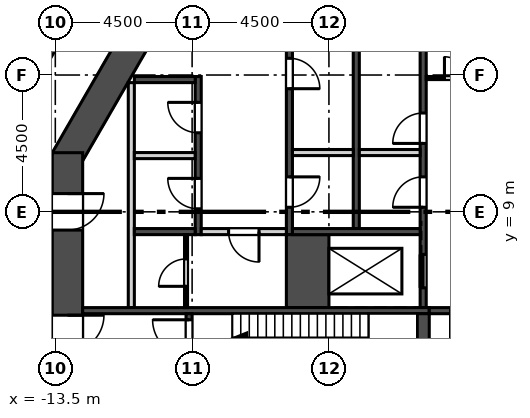
"""IFC4 building model, lengths in metres.
Left out: names, types, materials, properties, quantities, classifications, styles, units other than length and angle.
Written with IfcOpenShell. Run it as: python <this file> out.ifc"""

import sys

from ifc_helpers import new_model, si_unit, direction, frame, frame_2d, origin, place, context, subcontext, project, spatial, rectangle, extrude, element, fill, save


model = new_model("IFC4")
c1 = context("Model", 3, precision=1e-05, world=origin(), true_north=direction((0.0, 1.0)))
c2 = subcontext(c1, "Body", "Model", "MODEL_VIEW")
j1 = project(units=[si_unit("LENGTHUNIT", "METRE"), si_unit("PLANEANGLEUNIT", "RADIAN")], contexts=[c1])
p1 = place(None, origin())
s1 = spatial("IfcSite", under=j1, at=p1, CompositionType="ELEMENT")
p2 = place(p1, origin())
s2 = spatial("IfcBuilding", under=s1, at=p2, CompositionType="ELEMENT")
p3 = place(p2, frame((0.0, 0.0, 218.1)))
s3 = spatial("IfcBuildingStorey", under=s2, at=p3, CompositionType="ELEMENT", Elevation=218.1)
p4 = place(p3, frame((-8.748, 18.35, 0.0), z_axis=(0.0, 0.0, 1.0), x_axis=(-0.499995021168, -0.866028278295, 0.0)))
e1 = element("IfcWall", 1, at=p4, inside=s3, PredefinedType="SHEAR", context=c2, shape_type="SweptSolid", body=[
    extrude(rectangle(XDim=8.839, YDim=1.0, at=frame_2d((4.419, 0.0))), origin(), (0.0, 0.0, 1.0), 5.4),
])
p5 = place(p3, frame((-13.1, 10.945, 0.0), z_axis=(0.0, 0.0, 1.0), x_axis=(0.0, -1.0, 0.0)))
e2 = element("IfcWall", 2, at=p5, inside=s3, PredefinedType="SHEAR", context=c2, shape_type="SweptSolid", body=[
    extrude(rectangle(XDim=9.695, YDim=1.0, at=frame_2d((4.848, 0.0))), origin(), (0.0, 0.0, 1.0), 5.4),
])
p6 = place(p5, frame((5.345, 0.0, 0.0)))
e3 = element("IfcOpeningElement", 3, at=p6, cuts=e2, PredefinedType="OPENING", context=c2, shape_type="SweptSolid", body=[
    extrude(rectangle(XDim=1.2, YDim=2.1, at=frame_2d((0.6, 1.05))), frame((0.0, 0.51, 0.0), z_axis=(0.0, -1.0, 0.0), x_axis=(1.0, 0.0, 0.0)), (0.0, 0.0, 1.0), 1.02),
])
p7 = place(p5, frame((1.345, 0.0, 0.0)))
e4 = element("IfcOpeningElement", 4, at=p7, cuts=e2, PredefinedType="OPENING", context=c2, shape_type="SweptSolid", body=[
    extrude(rectangle(XDim=1.2, YDim=2.1, at=frame_2d((0.6, 1.05))), frame((0.0, 0.51, 0.0), z_axis=(0.0, -1.0, 0.0), x_axis=(1.0, 0.0, 0.0)), (0.0, 0.0, 1.0), 1.02),
])
p8 = place(p3, frame((-4.353, 47.177, 0.0), z_axis=(0.0, 0.0, 1.0), x_axis=(-0.500000533701, -0.866025095652, 0.0)))
e5 = element("IfcWall", 5, at=p8, inside=s3, PredefinedType="SOLIDWALL", context=c2, shape_type="SweptSolid", body=[
    extrude(rectangle(XDim=45.573, YDim=0.34, at=frame_2d((22.787, 0.0))), origin(), (0.0, 0.0, 1.0), 5.0),
])
p9 = place(p8, frame((2.68, 0.0, 0.9)))
e6 = element("IfcOpeningElement", 6, at=p9, cuts=e5, PredefinedType="OPENING", context=c2, shape_type="SweptSolid", body=[
    extrude(rectangle(XDim=1.885, YDim=3.0, at=frame_2d((0.942, 1.5))), frame((0.0, 0.18, 0.0), z_axis=(0.0, -1.0, 0.0), x_axis=(1.0, 0.0, 0.0)), (0.0, 0.0, 1.0), 0.36),
])
p10 = place(p8, frame((5.68, 0.0, 0.9)))
e7 = element("IfcOpeningElement", 7, at=p10, cuts=e5, PredefinedType="OPENING", context=c2, shape_type="SweptSolid", body=[
    extrude(rectangle(XDim=1.885, YDim=3.0, at=frame_2d((0.942, 1.5))), frame((0.0, 0.18, 0.0), z_axis=(0.0, -1.0, 0.0), x_axis=(1.0, 0.0, 0.0)), (0.0, 0.0, 1.0), 0.36),
])
p11 = place(p8, frame((8.68, 0.0, 0.9)))
e8 = element("IfcOpeningElement", 8, at=p11, cuts=e5, PredefinedType="OPENING", context=c2, shape_type="SweptSolid", body=[
    extrude(rectangle(XDim=1.885, YDim=3.0, at=frame_2d((0.942, 1.5))), frame((0.0, 0.18, 0.0), z_axis=(0.0, -1.0, 0.0), x_axis=(1.0, 0.0, 0.0)), (0.0, 0.0, 1.0), 0.36),
])
p12 = place(p8, frame((11.68, 0.0, 0.9)))
e9 = element("IfcOpeningElement", 9, at=p12, cuts=e5, PredefinedType="OPENING", context=c2, shape_type="SweptSolid", body=[
    extrude(rectangle(XDim=1.885, YDim=3.0, at=frame_2d((0.942, 1.5))), frame((0.0, 0.18, 0.0), z_axis=(0.0, -1.0, 0.0), x_axis=(1.0, 0.0, 0.0)), (0.0, 0.0, 1.0), 0.36),
])
p13 = place(p8, frame((14.68, 0.0, 0.9)))
e10 = element("IfcOpeningElement", 10, at=p13, cuts=e5, PredefinedType="OPENING", context=c2, shape_type="SweptSolid", body=[
    extrude(rectangle(XDim=1.885, YDim=3.0, at=frame_2d((0.942, 1.5))), frame((0.0, 0.18, 0.0), z_axis=(0.0, -1.0, 0.0), x_axis=(1.0, 0.0, 0.0)), (0.0, 0.0, 1.0), 0.36),
])
p14 = place(p8, frame((17.68, 0.0, 0.9)))
e11 = element("IfcOpeningElement", 11, at=p14, cuts=e5, PredefinedType="OPENING", context=c2, shape_type="SweptSolid", body=[
    extrude(rectangle(XDim=1.885, YDim=3.0, at=frame_2d((0.942, 1.5))), frame((0.0, 0.18, 0.0), z_axis=(0.0, -1.0, 0.0), x_axis=(1.0, 0.0, 0.0)), (0.0, 0.0, 1.0), 0.36),
])
p15 = place(p8, frame((20.68, 0.0, 0.9)))
e12 = element("IfcOpeningElement", 12, at=p15, cuts=e5, PredefinedType="OPENING", context=c2, shape_type="SweptSolid", body=[
    extrude(rectangle(XDim=1.885, YDim=3.0, at=frame_2d((0.942, 1.5))), frame((0.0, 0.18, 0.0), z_axis=(0.0, -1.0, 0.0), x_axis=(1.0, 0.0, 0.0)), (0.0, 0.0, 1.0), 0.36),
])
p16 = place(p8, frame((23.68, 0.0, 0.9)))
e13 = element("IfcOpeningElement", 13, at=p16, cuts=e5, PredefinedType="OPENING", context=c2, shape_type="SweptSolid", body=[
    extrude(rectangle(XDim=1.885, YDim=3.0, at=frame_2d((0.942, 1.5))), frame((0.0, 0.18, 0.0), z_axis=(0.0, -1.0, 0.0), x_axis=(1.0, 0.0, 0.0)), (0.0, 0.0, 1.0), 0.36),
])
p17 = place(p8, frame((26.68, 0.0, 0.9)))
e14 = element("IfcOpeningElement", 14, at=p17, cuts=e5, PredefinedType="OPENING", context=c2, shape_type="SweptSolid", body=[
    extrude(rectangle(XDim=1.885, YDim=3.0, at=frame_2d((0.942, 1.5))), frame((0.0, 0.18, 0.0), z_axis=(0.0, -1.0, 0.0), x_axis=(1.0, 0.0, 0.0)), (0.0, 0.0, 1.0), 0.36),
])
p18 = place(p8, frame((29.68, 0.0, 0.9)))
e15 = element("IfcOpeningElement", 15, at=p18, cuts=e5, PredefinedType="OPENING", context=c2, shape_type="SweptSolid", body=[
    extrude(rectangle(XDim=1.885, YDim=3.0, at=frame_2d((0.942, 1.5))), frame((0.0, 0.18, 0.0), z_axis=(0.0, -1.0, 0.0), x_axis=(1.0, 0.0, 0.0)), (0.0, 0.0, 1.0), 0.36),
])
p19 = place(p8, frame((32.68, 0.0, 0.9)))
e16 = element("IfcOpeningElement", 16, at=p19, cuts=e5, PredefinedType="OPENING", context=c2, shape_type="SweptSolid", body=[
    extrude(rectangle(XDim=1.885, YDim=3.0, at=frame_2d((0.942, 1.5))), frame((0.0, 0.18, 0.0), z_axis=(0.0, -1.0, 0.0), x_axis=(1.0, 0.0, 0.0)), (0.0, 0.0, 1.0), 0.36),
])
p20 = place(p8, frame((35.68, 0.0, 0.9)))
e17 = element("IfcOpeningElement", 17, at=p20, cuts=e5, PredefinedType="OPENING", context=c2, shape_type="SweptSolid", body=[
    extrude(rectangle(XDim=1.885, YDim=3.0, at=frame_2d((0.942, 1.5))), frame((0.0, 0.18, 0.0), z_axis=(0.0, -1.0, 0.0), x_axis=(1.0, 0.0, 0.0)), (0.0, 0.0, 1.0), 0.36),
])
p21 = place(p8, frame((38.68, 0.0, 0.9)))
e18 = element("IfcOpeningElement", 18, at=p21, cuts=e5, PredefinedType="OPENING", context=c2, shape_type="SweptSolid", body=[
    extrude(rectangle(XDim=1.885, YDim=3.0, at=frame_2d((0.942, 1.5))), frame((0.0, 0.18, 0.0), z_axis=(0.0, -1.0, 0.0), x_axis=(1.0, 0.0, 0.0)), (0.0, 0.0, 1.0), 0.36),
])
p22 = place(p8, frame((41.68, 0.0, 0.9)))
e19 = element("IfcOpeningElement", 19, at=p22, cuts=e5, PredefinedType="OPENING", context=c2, shape_type="SweptSolid", body=[
    extrude(rectangle(XDim=1.885, YDim=3.0, at=frame_2d((0.942, 1.5))), frame((0.0, 0.18, 0.0), z_axis=(0.0, -1.0, 0.0), x_axis=(1.0, 0.0, 0.0)), (0.0, 0.0, 1.0), 0.36),
])
p23 = place(p3, frame((-11.0, 5.85, 0.0), z_axis=(0.0, 0.0, 1.0), x_axis=(0.0, 1.0, 0.0)))
e20 = element("IfcWall", 20, at=p23, inside=s3, PredefinedType="SOLIDWALL", context=c2, shape_type="SweptSolid", body=[
    extrude(rectangle(XDim=7.4, YDim=0.2, at=frame_2d((3.7, 0.0))), origin(), (0.0, 0.0, 1.0), 5.0),
])
p24 = place(p3, frame((-8.8, 8.25, -0.4), z_axis=(0.0, 0.0, 1.0), x_axis=(0.0, 1.0, 0.0)))
e21 = element("IfcWall", 21, at=p24, inside=s3, PredefinedType="SOLIDWALL", context=c2, shape_type="SweptSolid", body=[
    extrude(rectangle(XDim=5.2, YDim=0.2, at=frame_2d((2.6, 0.0))), origin(), (0.0, 0.0, 1.0), 5.4),
])
p25 = place(p24, frame((0.85, 0.0, 0.4)))
e22 = element("IfcOpeningElement", 22, at=p25, cuts=e21, PredefinedType="OPENING", context=c2, shape_type="SweptSolid", body=[
    extrude(rectangle(XDim=1.0, YDim=2.1, at=frame_2d((0.5, 1.05))), frame((0.0, 0.11, 0.0), z_axis=(0.0, -1.0, 0.0), x_axis=(1.0, 0.0, 0.0)), (0.0, 0.0, 1.0), 0.22),
])
p26 = place(p24, frame((3.35, 0.0, 0.4)))
e23 = element("IfcOpeningElement", 23, at=p26, cuts=e21, PredefinedType="OPENING", context=c2, shape_type="SweptSolid", body=[
    extrude(rectangle(XDim=1.0, YDim=2.1, at=frame_2d((0.5, 1.05))), frame((0.0, 0.11, 0.0), z_axis=(0.0, -1.0, 0.0), x_axis=(1.0, 0.0, 0.0)), (0.0, 0.0, 1.0), 0.22),
])
p27 = place(p3, frame((-5.8, 8.25, -0.4), z_axis=(0.0, 0.0, 1.0), x_axis=(0.0, 1.0, 0.0)))
e24 = element("IfcWall", 24, at=p27, inside=s3, PredefinedType="SOLIDWALL", context=c2, shape_type="SweptSolid", body=[
    extrude(rectangle(XDim=8.0, YDim=0.2, at=frame_2d((4.0, 0.0))), origin(), (0.0, 0.0, 1.0), 5.4),
])
p28 = place(p27, frame((0.9, 0.0, 0.4)))
e25 = element("IfcOpeningElement", 25, at=p28, cuts=e24, PredefinedType="OPENING", context=c2, shape_type="SweptSolid", body=[
    extrude(rectangle(XDim=1.0, YDim=2.1, at=frame_2d((0.5, 1.05))), frame((0.0, 0.11, 0.0), z_axis=(0.0, -1.0, 0.0), x_axis=(1.0, 0.0, 0.0)), (0.0, 0.0, 1.0), 0.22),
])
p29 = place(p27, frame((4.8, 0.0, 0.4)))
e26 = element("IfcOpeningElement", 26, at=p29, cuts=e24, PredefinedType="OPENING", context=c2, shape_type="SweptSolid", body=[
    extrude(rectangle(XDim=1.0, YDim=2.1, at=frame_2d((0.5, 1.05))), frame((0.0, 0.11, 0.0), z_axis=(0.0, -1.0, 0.0), x_axis=(1.0, 0.0, 0.0)), (0.0, 0.0, 1.0), 0.22),
])
p30 = place(p3, frame((-3.6, 8.45, -0.4), z_axis=(0.0, 0.0, 1.0), x_axis=(0.0, 1.0, 0.0)))
e27 = element("IfcWall", 27, at=p30, inside=s3, PredefinedType="SOLIDWALL", context=c2, shape_type="SweptSolid", body=[
    extrude(rectangle(XDim=7.8, YDim=0.2, at=frame_2d((3.9, 0.0))), origin(), (0.0, 0.0, 1.0), 5.4),
])
p31 = place(p3, frame((-1.4, 5.85, -0.4), z_axis=(0.0, 0.0, 1.0), x_axis=(0.0, 1.0, 0.0)))
e28 = element("IfcWall", 28, at=p31, inside=s3, PredefinedType="SOLIDWALL", context=c2, shape_type="SweptSolid", body=[
    extrude(rectangle(XDim=11.75, YDim=0.2, at=frame_2d((5.875, 0.0))), origin(), (0.0, 0.0, 1.0), 5.4),
])
p32 = place(p31, frame((0.65, 0.0, 0.4)))
e29 = element("IfcOpeningElement", 29, at=p32, cuts=e28, PredefinedType="OPENING", context=c2, shape_type="SweptSolid", body=[
    extrude(rectangle(XDim=1.1, YDim=2.1, at=frame_2d((0.55, 1.05))), frame((0.0, 0.11, 0.0), z_axis=(0.0, -1.0, 0.0), x_axis=(1.0, 0.0, 0.0)), (0.0, 0.0, 1.0), 0.22),
])
p33 = place(p31, frame((3.3, 0.0, 0.4)))
e30 = element("IfcOpeningElement", 30, at=p33, cuts=e28, PredefinedType="OPENING", context=c2, shape_type="SweptSolid", body=[
    extrude(rectangle(XDim=1.0, YDim=2.1, at=frame_2d((0.5, 1.05))), frame((0.0, 0.11, 0.0), z_axis=(0.0, -1.0, 0.0), x_axis=(1.0, 0.0, 0.0)), (0.0, 0.0, 1.0), 0.22),
])
p34 = place(p31, frame((5.4, 0.0, 0.4)))
e31 = element("IfcOpeningElement", 31, at=p34, cuts=e28, PredefinedType="OPENING", context=c2, shape_type="SweptSolid", body=[
    extrude(rectangle(XDim=1.0, YDim=2.1, at=frame_2d((0.5, 1.05))), frame((0.0, 0.11, 0.0), z_axis=(0.0, -1.0, 0.0), x_axis=(1.0, 0.0, 0.0)), (0.0, 0.0, 1.0), 0.22),
])
p35 = place(p3, frame((-5.2, 5.85, -0.4), z_axis=(0.0, 0.0, 1.0), x_axis=(0.0, 1.0, 0.0)))
e32 = element("IfcWall", 32, at=p35, inside=s3, PredefinedType="SOLIDWALL", context=c2, shape_type="SweptSolid", body=[
    extrude(rectangle(XDim=2.4, YDim=1.4, at=frame_2d((1.2, 0.0))), origin(), (0.0, 0.0, 1.0), 5.4),
])
p36 = place(p3, frame((-10.9, 8.35, -0.4), z_axis=(0.0, 0.0, 1.0), x_axis=(1.0, 0.0, 0.0)))
e33 = element("IfcWall", 33, at=p36, inside=s3, PredefinedType="SOLIDWALL", context=c2, shape_type="SweptSolid", body=[
    extrude(rectangle(XDim=2.0, YDim=0.2, at=frame_2d((1.0, 0.0))), origin(), (0.0, 0.0, 1.0), 5.4),
])
p37 = place(p3, frame((-5.7, 8.35, -0.4), z_axis=(0.0, 0.0, 1.0), x_axis=(1.0, 0.0, 0.0)))
e34 = element("IfcWall", 34, at=p37, inside=s3, PredefinedType="SOLIDWALL", context=c2, shape_type="SweptSolid", body=[
    extrude(rectangle(XDim=4.2, YDim=0.2, at=frame_2d((2.1, 0.0))), origin(), (0.0, 0.0, 1.0), 5.4),
])
p38 = place(p3, frame((-12.6, 5.75, -0.4), z_axis=(0.0, 0.0, 1.0), x_axis=(1.0, 0.0, 0.0)))
e35 = element("IfcWall", 35, at=p38, inside=s3, PredefinedType="SOLIDWALL", context=c2, shape_type="SweptSolid", body=[
    extrude(rectangle(XDim=11.4, YDim=0.2, at=frame_2d((5.7, 0.0))), origin(), (0.0, 0.0, 1.0), 5.4),
])
p39 = place(p3, frame((-1.2, 5.75, -0.4), z_axis=(0.0, 0.0, 1.0), x_axis=(1.0, 0.0, 0.0)))
e36 = element("IfcWall", 36, at=p39, inside=s3, PredefinedType="SOLIDWALL", context=c2, shape_type="SweptSolid", body=[
    extrude(rectangle(XDim=2.4, YDim=0.2, at=frame_2d((1.2, 0.0))), origin(), (0.0, 0.0, 1.0), 5.4),
])
p40 = place(p39, frame((0.7, 0.0, 0.4)))
e37 = element("IfcOpeningElement", 37, at=p40, cuts=e36, PredefinedType="OPENING", context=c2, shape_type="SweptSolid", body=[
    extrude(rectangle(XDim=1.0, YDim=2.1, at=frame_2d((0.5, 1.05))), frame((0.0, 0.11, 0.0), z_axis=(0.0, -1.0, 0.0), x_axis=(1.0, 0.0, 0.0)), (0.0, 0.0, 1.0), 0.22),
])
p41 = place(p3, frame((-9.1, 2.25, -0.4), z_axis=(0.0, 0.0, 1.0), x_axis=(0.0, 1.0, 0.0)))
e38 = element("IfcWall", 38, at=p41, inside=s3, PredefinedType="SOLIDWALL", context=c2, shape_type="SweptSolid", body=[
    extrude(rectangle(XDim=3.4, YDim=0.2, at=frame_2d((1.7, 0.0))), origin(), (0.0, 0.0, 1.0), 5.4),
])
p42 = place(p41, frame((0.2, 0.0, 0.4)))
e39 = element("IfcOpeningElement", 39, at=p42, cuts=e38, PredefinedType="OPENING", context=c2, shape_type="SweptSolid", body=[
    extrude(rectangle(XDim=1.2, YDim=2.1, at=frame_2d((0.6, 1.05))), frame((0.0, 0.11, 0.0), z_axis=(0.0, -1.0, 0.0), x_axis=(1.0, 0.0, 0.0)), (0.0, 0.0, 1.0), 0.22),
])
p43 = place(p41, frame((2.0, 0.0, 0.4)))
e40 = element("IfcOpeningElement", 40, at=p43, cuts=e38, PredefinedType="OPENING", context=c2, shape_type="SweptSolid", body=[
    extrude(rectangle(XDim=1.2, YDim=2.1, at=frame_2d((0.6, 1.05))), frame((0.0, 0.11, 0.0), z_axis=(0.0, -1.0, 0.0), x_axis=(1.0, 0.0, 0.0)), (0.0, 0.0, 1.0), 0.22),
])
p44 = place(p3, frame((-1.4, 2.25, -0.4), z_axis=(0.0, 0.0, 1.0), x_axis=(0.0, 1.0, 0.0)))
e41 = element("IfcWall", 41, at=p44, inside=s3, PredefinedType="SOLIDWALL", context=c2, shape_type="SweptSolid", body=[
    extrude(rectangle(XDim=3.4, YDim=0.4, at=frame_2d((1.7, 0.0))), origin(), (0.0, 0.0, 1.0), 5.4),
])
p45 = place(p3, frame((-10.9, 10.85, 0.0), z_axis=(0.0, 0.0, 1.0), x_axis=(1.0, 0.0, 0.0)))
e42 = element("IfcWall", 42, at=p45, inside=s3, PredefinedType="SOLIDWALL", context=c2, shape_type="SweptSolid", body=[
    extrude(rectangle(XDim=2.0, YDim=0.2, at=frame_2d((1.0, 0.0))), origin(), (0.0, 0.0, 1.0), 5.0),
])
p46 = place(p3, frame((-10.9, 13.35, -0.4), z_axis=(0.0, 0.0, 1.0), x_axis=(1.0, 0.0, 0.0)))
e43 = element("IfcWall", 43, at=p46, inside=s3, PredefinedType="SOLIDWALL", context=c2, shape_type="SweptSolid", body=[
    extrude(rectangle(XDim=2.0, YDim=0.2, at=frame_2d((1.0, 0.0))), origin(), (0.0, 0.0, 1.0), 5.4),
])
for number, where, z_axis, x_axis in (
    (44, (-5.7, 10.95, 0.0), (0.0, 0.0, 1.0), (1.0, 0.0, 0.0)),
    (45, (-3.5, 10.95, 0.0), (0.0, 0.0, 1.0), (1.0, 0.0, 0.0)),
):
    element("IfcWall", number, at=place(p3, frame(where, z_axis=z_axis, x_axis=x_axis)), inside=s3, PredefinedType="SOLIDWALL", context=c2, shape_type="SweptSolid", body=[
        extrude(rectangle(XDim=2.0, YDim=0.2, at=frame_2d((1.0, 0.0))), origin(), (0.0, 0.0, 1.0), 5.0),
    ])
p47 = place(p3, frame((-9.2, 5.85, 0.0), z_axis=(0.0, 0.0, 1.0), x_axis=(0.0, 1.0, 0.0)))
e46 = element("IfcWall", 46, at=p47, inside=s3, PredefinedType="PARTITIONING", context=c2, shape_type="SweptSolid", body=[
    extrude(rectangle(XDim=2.4, YDim=0.1, at=frame_2d((1.2, 0.0))), origin(), (0.0, 0.0, 1.0), 5.0),
])
p48 = place(p47, frame((0.7, 0.0, 0.0)))
e47 = element("IfcOpeningElement", 47, at=p48, cuts=e46, PredefinedType="OPENING", context=c2, shape_type="SweptSolid", body=[
    extrude(rectangle(XDim=0.9, YDim=2.1, at=frame_2d((0.45, 1.05))), frame((0.0, 0.06, 0.0), z_axis=(0.0, -1.0, 0.0), x_axis=(1.0, 0.0, 0.0)), (0.0, 0.0, 1.0), 0.12),
])
p49 = place(p3, frame((-8.7, 8.35, 0.0), z_axis=(0.0, 0.0, 1.0), x_axis=(1.0, 0.0, 0.0)))
e48 = element("IfcWall", 48, at=p49, inside=s3, PredefinedType="SOLIDWALL", context=c2, shape_type="SweptSolid", body=[
    extrude(rectangle(XDim=2.8, YDim=0.2, at=frame_2d((1.4, 0.0))), origin(), (0.0, 0.0, 1.0), 5.0),
])
p50 = place(p49, frame((0.9, 0.0, 0.0)))
e49 = element("IfcOpeningElement", 49, at=p50, cuts=e48, PredefinedType="OPENING", context=c2, shape_type="SweptSolid", body=[
    extrude(rectangle(XDim=1.0, YDim=2.1, at=frame_2d((0.5, 1.05))), frame((0.0, 0.11, 0.0), z_axis=(0.0, -1.0, 0.0), x_axis=(1.0, 0.0, 0.0)), (0.0, 0.0, 1.0), 0.22),
])
p51 = place(p3, frame((-1.3, 13.4, 0.0), z_axis=(0.0, 0.0, 1.0), x_axis=(1.0, 0.0, 0.0)))
e50 = element("IfcWall", 50, at=p51, inside=s3, PredefinedType="PARTITIONING", context=c2, shape_type="SweptSolid", body=[
    extrude(rectangle(XDim=2.6, YDim=0.1, at=frame_2d((1.3, 0.0))), origin(), (0.0, 0.0, 1.0), 5.0),
])
p52 = place(p51, frame((0.6, 0.0, 0.0)))
e51 = element("IfcOpeningElement", 51, at=p52, cuts=e50, PredefinedType="OPENING", context=c2, shape_type="SweptSolid", body=[
    extrude(rectangle(XDim=1.4, YDim=2.1, at=frame_2d((0.7, 1.05))), frame((0.0, 0.06, 0.0), z_axis=(0.0, -1.0, 0.0), x_axis=(1.0, 0.0, 0.0)), (0.0, 0.0, 1.0), 0.12),
])
p53 = place(p3, frame((-15.226, 11.629, 0.0), z_axis=(0.0, 0.0, 1.0), x_axis=(0.50000302904, 0.86602365496, 0.0)))
e52 = element("IfcWall", 52, at=p53, inside=s3, PredefinedType="SOLIDWALL", context=c2, shape_type="SweptSolid", body=[
    extrude(rectangle(XDim=9.867, YDim=0.3, at=frame_2d((4.934, 0.0))), origin(), (0.0, 0.0, 1.0), 5.0),
])
p54 = place(p32, origin())
e53 = element("IfcDoor", 53, at=p54, inside=s3, OperationType="SLIDING_TO_RIGHT", PredefinedType="DOOR", context=c2, shape_type="SweptSolid", body=[
    extrude(rectangle(XDim=1.1, YDim=2.1, at=frame_2d((0.55, 1.05))), frame((0.0, 0.025, 0.0), z_axis=(0.0, -1.0, 0.0), x_axis=(1.0, 0.0, 0.0)), (0.0, 0.0, 1.0), 0.05),
])
fill(e29, e53)
p55 = place(p25, origin())
e54 = element("IfcDoor", 54, at=p55, inside=s3, OperationType="SINGLE_SWING_RIGHT", PredefinedType="DOOR", context=c2, shape_type="SweptSolid", body=[
    extrude(rectangle(XDim=1.0, YDim=2.1, at=frame_2d((0.5, 1.05))), frame((0.0, 0.025, 0.0), z_axis=(0.0, -1.0, 0.0), x_axis=(1.0, 0.0, 0.0)), (0.0, 0.0, 1.0), 0.05),
])
fill(e22, e54)
p56 = place(p26, origin())
e55 = element("IfcDoor", 55, at=p56, inside=s3, OperationType="SINGLE_SWING_RIGHT", PredefinedType="DOOR", context=c2, shape_type="SweptSolid", body=[
    extrude(rectangle(XDim=1.0, YDim=2.1, at=frame_2d((0.5, 1.05))), frame((0.0, 0.025, 0.0), z_axis=(0.0, -1.0, 0.0), x_axis=(1.0, 0.0, 0.0)), (0.0, 0.0, 1.0), 0.05),
])
fill(e23, e55)
p57 = place(p28, frame((1.0, 0.0, 0.0), z_axis=(0.0, 0.0, 1.0), x_axis=(-1.0, 0.0, 0.0)))
e56 = element("IfcDoor", 56, at=p57, inside=s3, OperationType="SINGLE_SWING_LEFT", PredefinedType="DOOR", context=c2, shape_type="SweptSolid", body=[
    extrude(rectangle(XDim=1.0, YDim=2.1, at=frame_2d((0.5, 1.05))), frame((0.0, 0.025, 0.0), z_axis=(0.0, -1.0, 0.0), x_axis=(1.0, 0.0, 0.0)), (0.0, 0.0, 1.0), 0.05),
])
fill(e25, e56)
p58 = place(p29, frame((1.0, 0.0, 0.0), z_axis=(0.0, 0.0, 1.0), x_axis=(-1.0, 0.0, 0.0)))
e57 = element("IfcDoor", 57, at=p58, inside=s3, OperationType="SINGLE_SWING_RIGHT", PredefinedType="DOOR", context=c2, shape_type="SweptSolid", body=[
    extrude(rectangle(XDim=1.0, YDim=2.1, at=frame_2d((0.5, 1.05))), frame((0.0, 0.025, 0.0), z_axis=(0.0, -1.0, 0.0), x_axis=(1.0, 0.0, 0.0)), (0.0, 0.0, 1.0), 0.05),
])
fill(e26, e57)
p59 = place(p33, origin())
e58 = element("IfcDoor", 58, at=p59, inside=s3, OperationType="SINGLE_SWING_LEFT", PredefinedType="DOOR", context=c2, shape_type="SweptSolid", body=[
    extrude(rectangle(XDim=1.0, YDim=2.1, at=frame_2d((0.5, 1.05))), frame((0.0, 0.025, 0.0), z_axis=(0.0, -1.0, 0.0), x_axis=(1.0, 0.0, 0.0)), (0.0, 0.0, 1.0), 0.05),
])
fill(e30, e58)
p60 = place(p34, origin())
e59 = element("IfcDoor", 59, at=p60, inside=s3, OperationType="SINGLE_SWING_LEFT", PredefinedType="DOOR", context=c2, shape_type="SweptSolid", body=[
    extrude(rectangle(XDim=1.0, YDim=2.1, at=frame_2d((0.5, 1.05))), frame((0.0, 0.025, 0.0), z_axis=(0.0, -1.0, 0.0), x_axis=(1.0, 0.0, 0.0)), (0.0, 0.0, 1.0), 0.05),
])
fill(e31, e59)
p61 = place(p50, frame((1.0, 0.0, 0.0), z_axis=(0.0, 0.0, 1.0), x_axis=(-1.0, 0.0, 0.0)))
e60 = element("IfcDoor", 60, at=p61, inside=s3, OperationType="SINGLE_SWING_LEFT", PredefinedType="DOOR", context=c2, shape_type="SweptSolid", body=[
    extrude(rectangle(XDim=1.0, YDim=2.1, at=frame_2d((0.5, 1.05))), frame((0.0, 0.025, 0.0), z_axis=(0.0, -1.0, 0.0), x_axis=(1.0, 0.0, 0.0)), (0.0, 0.0, 1.0), 0.05),
])
fill(e49, e60)
p62 = place(p48, origin())
e61 = element("IfcDoor", 61, at=p62, inside=s3, OperationType="SINGLE_SWING_LEFT", PredefinedType="DOOR", context=c2, shape_type="SweptSolid", body=[
    extrude(rectangle(XDim=0.9, YDim=2.1, at=frame_2d((0.45, 1.05))), frame((0.0, 0.025, 0.0), z_axis=(0.0, -1.0, 0.0), x_axis=(1.0, 0.0, 0.0)), (0.0, 0.0, 1.0), 0.05),
])
fill(e47, e61)
p63 = place(p6, origin())
e62 = element("IfcDoor", 62, at=p63, inside=s3, OperationType="SINGLE_SWING_LEFT", PredefinedType="DOOR", context=c2, shape_type="SweptSolid", body=[
    extrude(rectangle(XDim=1.2, YDim=2.1, at=frame_2d((0.6, 1.05))), frame((0.0, 0.025, 0.0), z_axis=(0.0, -1.0, 0.0), x_axis=(1.0, 0.0, 0.0)), (0.0, 0.0, 1.0), 0.05),
])
fill(e3, e62)
p64 = place(p7, origin())
e63 = element("IfcDoor", 63, at=p64, inside=s3, OperationType="SINGLE_SWING_LEFT", PredefinedType="DOOR", context=c2, shape_type="SweptSolid", body=[
    extrude(rectangle(XDim=1.2, YDim=2.1, at=frame_2d((0.6, 1.05))), frame((0.0, 0.025, 0.0), z_axis=(0.0, -1.0, 0.0), x_axis=(1.0, 0.0, 0.0)), (0.0, 0.0, 1.0), 0.05),
])
fill(e4, e63)
p65 = place(p52, origin())
e64 = element("IfcDoor", 64, at=p65, inside=s3, OperationType="DOUBLE_DOOR_SINGLE_SWING", PredefinedType="DOOR", context=c2, shape_type="SweptSolid", body=[
    extrude(rectangle(XDim=1.4, YDim=2.1, at=frame_2d((0.7, 1.05))), frame((0.0, 0.025, 0.0), z_axis=(0.0, -1.0, 0.0), x_axis=(1.0, 0.0, 0.0)), (0.0, 0.0, 1.0), 0.05),
])
fill(e51, e64)
p66 = place(p43, origin())
e65 = element("IfcDoor", 65, at=p66, inside=s3, OperationType="SINGLE_SWING_RIGHT", PredefinedType="DOOR", context=c2, shape_type="SweptSolid", body=[
    extrude(rectangle(XDim=1.2, YDim=2.1, at=frame_2d((0.6, 1.05))), frame((0.0, 0.025, 0.0), z_axis=(0.0, -1.0, 0.0), x_axis=(1.0, 0.0, 0.0)), (0.0, 0.0, 1.0), 0.05),
])
fill(e40, e65)
save(model, sys.argv[1])
